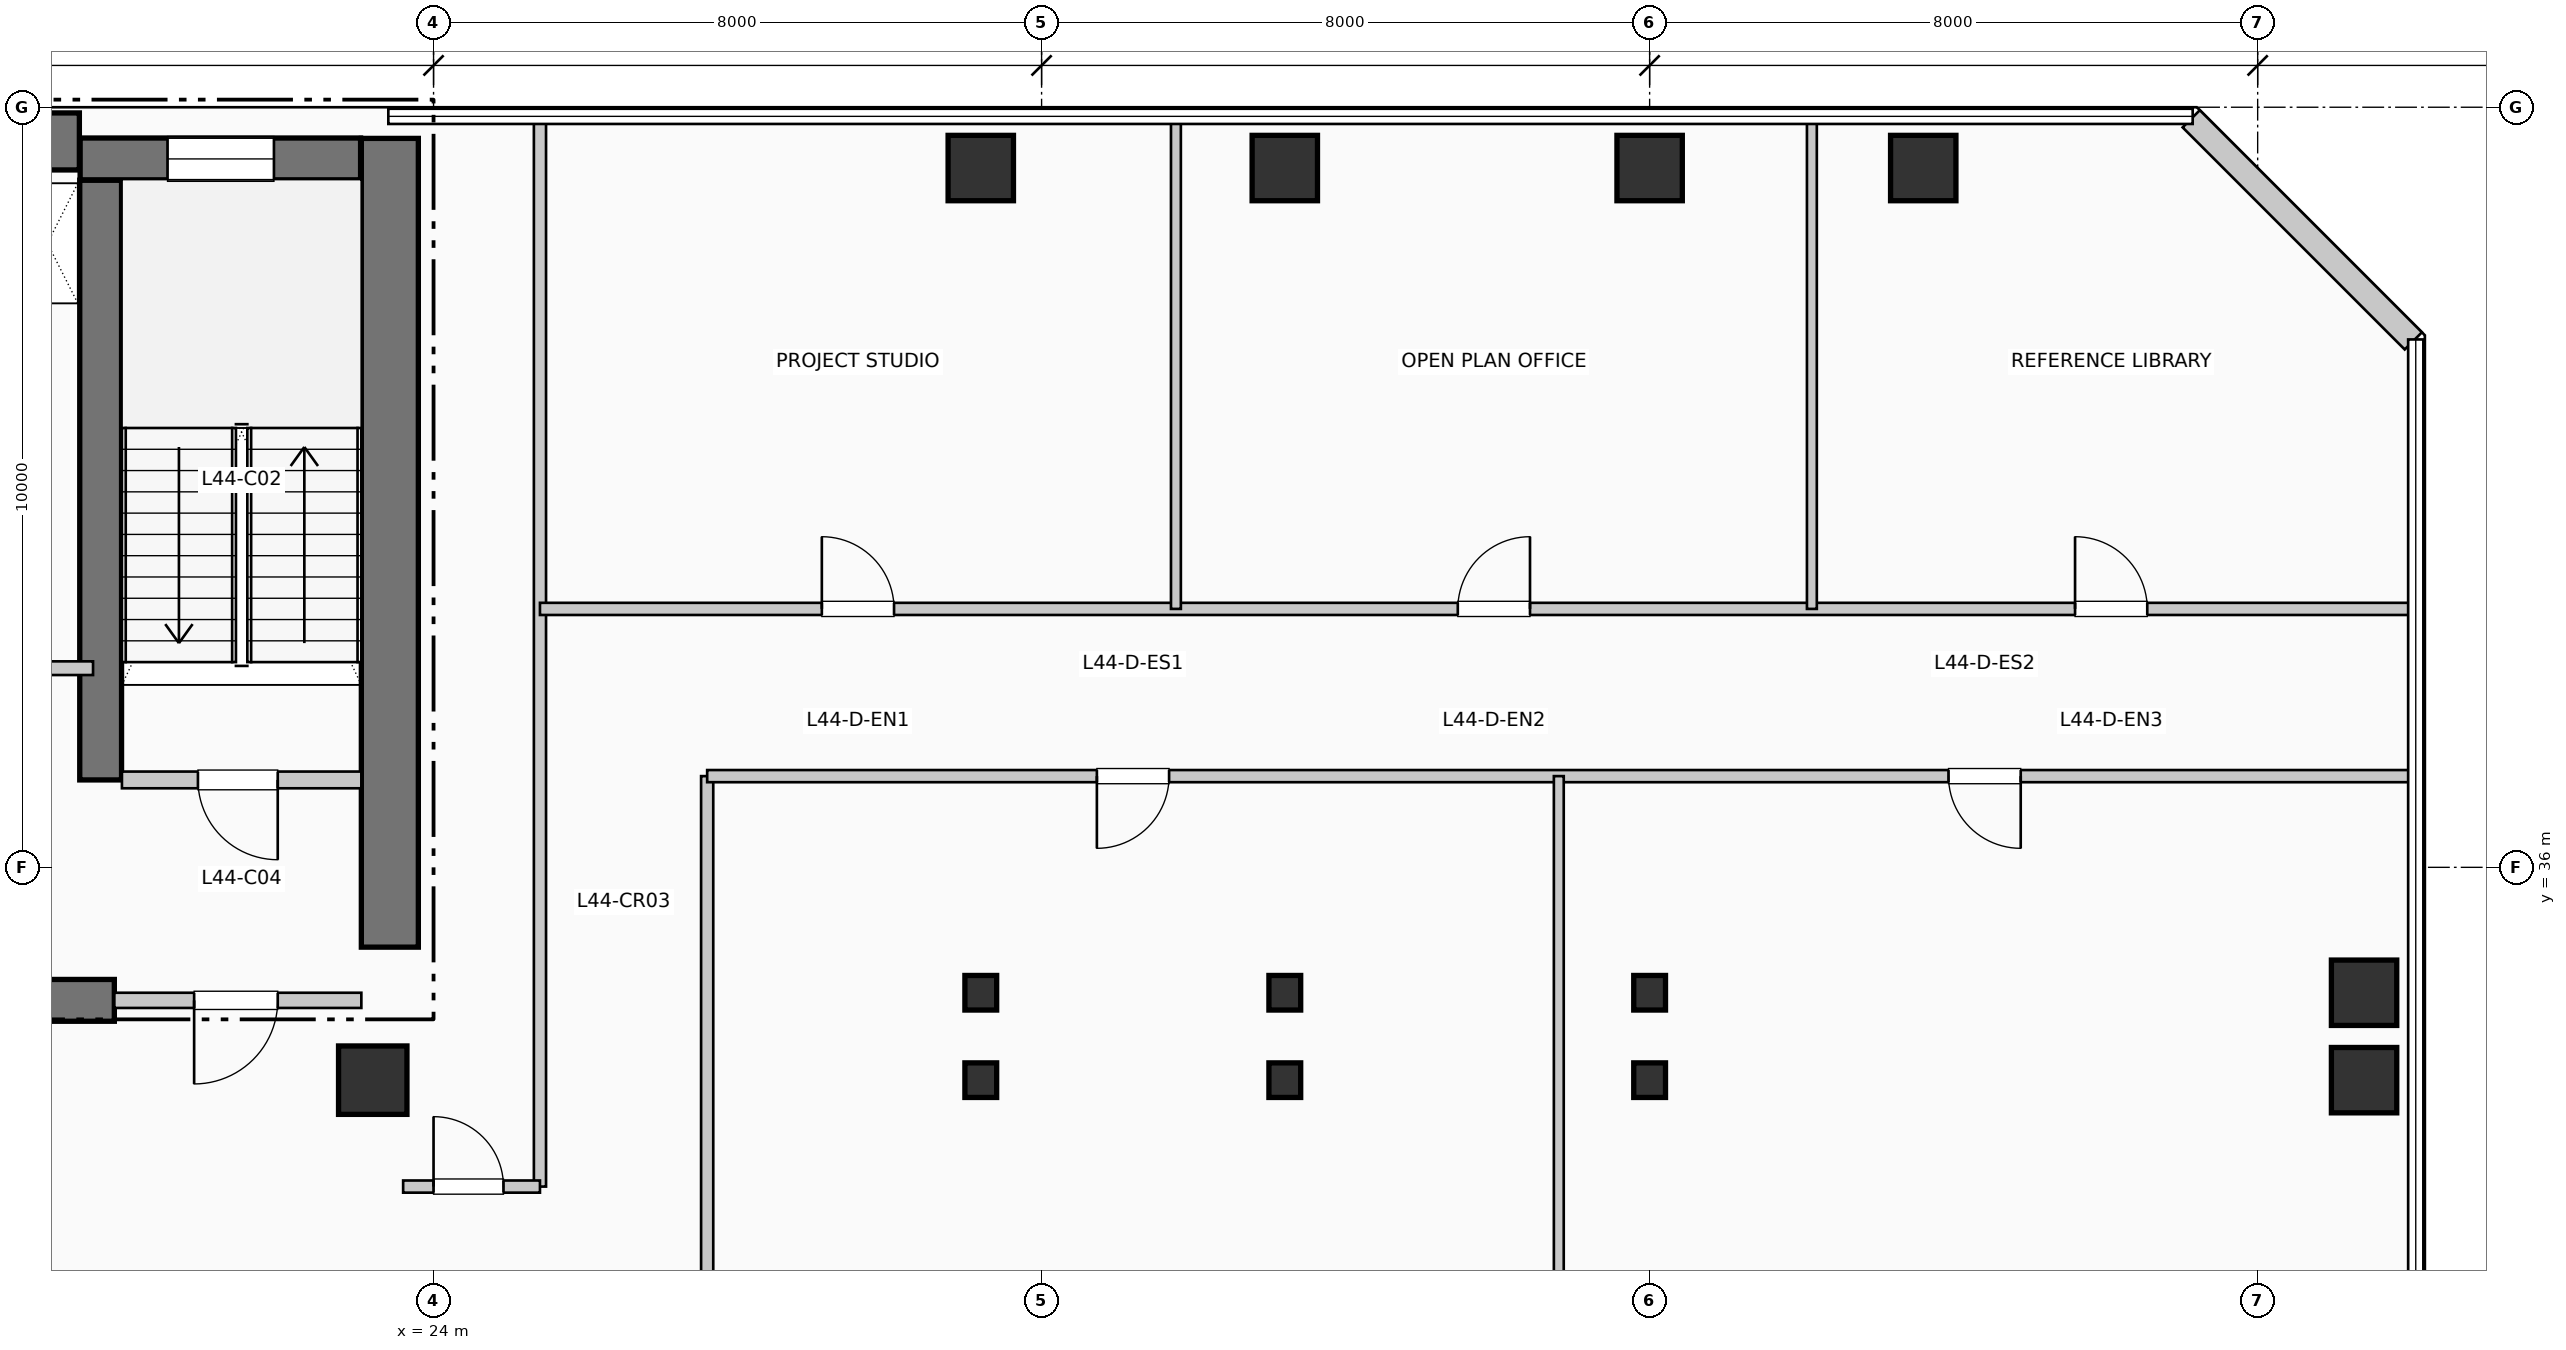
"""IFC4 building model, lengths in metres.
Left out: names, types, materials, properties, quantities, classifications, styles, units other than length and angle.
Written with IfcOpenShell. Run it as: python <this file> out.ifc"""

import sys

from ifc_helpers import new_model, si_unit, direction, frame, frame_2d, origin, origin_2d, place, context, subcontext, project, spatial, rectangle, i_section, extrude, element, fill, save


model = new_model("IFC4")
c1 = context("Model", 3, precision=1e-05, world=origin(), true_north=direction((0.0, 1.0)))
c2 = subcontext(c1, "Body", "Model", "MODEL_VIEW")
j1 = project(units=[si_unit("LENGTHUNIT", "METRE"), si_unit("PLANEANGLEUNIT", "RADIAN")], contexts=[c1])
p1 = place(None, origin())
s1 = spatial("IfcSite", under=j1, at=p1, CompositionType="ELEMENT")
p2 = place(p1, origin())
s2 = spatial("IfcBuilding", under=s1, at=p2, CompositionType="ELEMENT")
p3 = place(p2, frame((0.0, 0.0, 183.48)))
s3 = spatial("IfcBuildingStorey", under=s2, at=p3, CompositionType="ELEMENT", Elevation=183.48)
p4 = place(p3, frame((5.36, 45.55, 0.0), z_axis=(0.0, 0.0, 1.0), x_axis=(1.0, 0.0, 0.0)))
e1 = element("IfcWall", 1, at=p4, inside=s3, PredefinedType="SHEAR", context=c2, shape_type="SweptSolid", body=[
    extrude(rectangle(XDim=13.98, YDim=0.75, at=frame_2d((6.99, 0.0))), origin(), (0.0, 0.0, 1.0), 3.96),
])
p5 = place(p3, frame((23.425, 34.95, 0.0), z_axis=(0.0, 0.0, 1.0), x_axis=(0.0, 1.0, 0.0)))
e2 = element("IfcWall", 2, at=p5, inside=s3, PredefinedType="SHEAR", context=c2, shape_type="SweptSolid", body=[
    extrude(rectangle(XDim=10.64, YDim=0.75, at=frame_2d((5.32, 0.0))), origin(), (0.0, 0.0, 1.0), 3.96),
])
p6 = place(p3, frame((13.68, 34.25, 0.0), z_axis=(0.0, 0.0, 1.0), x_axis=(1.0, 0.0, 0.0)))
e3 = element("IfcWall", 3, at=p6, inside=s3, PredefinedType="SHEAR", context=c2, shape_type="SweptSolid", body=[
    extrude(rectangle(XDim=6.12, YDim=0.55, at=frame_2d((3.06, 0.0))), origin(), (0.0, 0.0, 1.0), 3.96),
])
p7 = place(p3, frame((19.62, 37.15, 0.0), z_axis=(0.0, 0.0, 1.0), x_axis=(0.0, 1.0, 0.0)))
e4 = element("IfcWall", 4, at=p7, inside=s3, PredefinedType="SHEAR", context=c2, shape_type="SweptSolid", body=[
    extrude(rectangle(XDim=7.89, YDim=0.55, at=frame_2d((3.945, 0.0))), origin(), (0.0, 0.0, 1.0), 3.96),
])
p8 = place(p3, frame((19.35, 45.32, 0.0), z_axis=(0.0, 0.0, 1.0), x_axis=(1.0, 0.0, 0.0)))
e5 = element("IfcWall", 5, at=p8, inside=s3, PredefinedType="SHEAR", context=c2, shape_type="SweptSolid", body=[
    extrude(rectangle(XDim=3.69, YDim=0.55, at=frame_2d((1.845, 0.0))), origin(), (0.0, 0.0, 1.0), 3.96),
])
p9 = place(p8, frame((1.15, 0.0, 1.05)))
e6 = element("IfcOpeningElement", 6, at=p9, cuts=e5, PredefinedType="OPENING", context=c2, shape_type="SweptSolid", body=[
    extrude(rectangle(XDim=1.4, YDim=1.8, at=frame_2d((0.7, 0.9))), frame((0.0, 0.285, 0.0), z_axis=(0.0, -1.0, 0.0), x_axis=(1.0, 0.0, 0.0)), (0.0, 0.0, 1.0), 0.57),
])
p10 = place(p3, frame((23.2, 33.2, 0.0), z_axis=(0.0, 0.0, 1.0), x_axis=(1.0, 0.0, 0.0)))
e7 = element("IfcColumn", 7, at=p10, inside=s3, PredefinedType="COLUMN", context=c2, shape_type="SweptSolid", body=[
    extrude(rectangle(XDim=0.9, YDim=0.9, at=origin_2d()), origin(), (0.0, 0.0, 1.0), 3.96),
])
for number, where, z_axis, x_axis in (
    (8, (31.2, 33.2, 0.0), (0.0, 0.0, 1.0), (1.0, 0.0, 0.0)),
    (9, (31.2, 34.35, 0.0), (0.0, 0.0, 1.0), (1.0, 0.0, 0.0)),
):
    element("IfcColumn", number, at=place(p3, frame(where, z_axis=z_axis, x_axis=x_axis)), inside=s3, PredefinedType="COLUMN", context=c2, shape_type="SweptSolid", body=[
        extrude(i_section(OverallWidth=0.418, OverallDepth=0.455, WebThickness=0.032, FlangeThickness=0.051, at=origin_2d()), origin(), (0.0, 0.0, 1.0), 3.96),
    ])
p11 = place(p3, frame((31.2, 45.2, 0.0), z_axis=(0.0, 0.0, 1.0), x_axis=(1.0, 0.0, 0.0)))
e10 = element("IfcColumn", 10, at=p11, inside=s3, PredefinedType="COLUMN", context=c2, shape_type="SweptSolid", body=[
    extrude(rectangle(XDim=0.86, YDim=0.86, at=origin_2d()), origin(), (0.0, 0.0, 1.0), 3.96),
])
for number, where, z_axis, x_axis in (
    (11, (35.2, 33.2, 0.0), (0.0, 0.0, 1.0), (1.0, 0.0, 0.0)),
    (12, (35.2, 34.35, 0.0), (0.0, 0.0, 1.0), (1.0, 0.0, 0.0)),
):
    element("IfcColumn", number, at=place(p3, frame(where, z_axis=z_axis, x_axis=x_axis)), inside=s3, PredefinedType="COLUMN", context=c2, shape_type="SweptSolid", body=[
        extrude(i_section(OverallWidth=0.418, OverallDepth=0.455, WebThickness=0.032, FlangeThickness=0.051, at=origin_2d()), origin(), (0.0, 0.0, 1.0), 3.96),
    ])
p12 = place(p3, frame((35.2, 45.2, 0.0), z_axis=(0.0, 0.0, 1.0), x_axis=(1.0, 0.0, 0.0)))
e13 = element("IfcColumn", 13, at=p12, inside=s3, PredefinedType="COLUMN", context=c2, shape_type="SweptSolid", body=[
    extrude(rectangle(XDim=0.86, YDim=0.86, at=origin_2d()), origin(), (0.0, 0.0, 1.0), 3.96),
])
for number, where, z_axis, x_axis in (
    (14, (40.0, 33.2, 0.0), (0.0, 0.0, 1.0), (1.0, 0.0, 0.0)),
    (15, (40.0, 34.35, 0.0), (0.0, 0.0, 1.0), (1.0, 0.0, 0.0)),
):
    element("IfcColumn", number, at=place(p3, frame(where, z_axis=z_axis, x_axis=x_axis)), inside=s3, PredefinedType="COLUMN", context=c2, shape_type="SweptSolid", body=[
        extrude(i_section(OverallWidth=0.418, OverallDepth=0.455, WebThickness=0.032, FlangeThickness=0.051, at=origin_2d()), origin(), (0.0, 0.0, 1.0), 3.96),
    ])
for number, where, z_axis, x_axis in (
    (16, (40.0, 45.2, 0.0), (0.0, 0.0, 1.0), (1.0, 0.0, 0.0)),
    (17, (43.6, 45.2, 0.0), (0.0, 0.0, 1.0), (1.0, 0.0, 0.0)),
    (18, (49.4, 33.2, 0.0), (0.0, 0.0, 1.0), (1.0, 0.0, 0.0)),
    (19, (49.4, 34.35, 0.0), (0.0, 0.0, 1.0), (1.0, 0.0, 0.0)),
):
    element("IfcColumn", number, at=place(p3, frame(where, z_axis=z_axis, x_axis=x_axis)), inside=s3, PredefinedType="COLUMN", context=c2, shape_type="SweptSolid", body=[
        extrude(rectangle(XDim=0.86, YDim=0.86, at=origin_2d()), origin(), (0.0, 0.0, 1.0), 3.96),
    ])
p13 = place(p3, frame((50.048, 42.926, 0.0), z_axis=(0.0, 0.0, 1.0), x_axis=(-0.707136318428, 0.707077242712, 0.0)))
e20 = element("IfcWall", 20, at=p13, inside=s3, PredefinedType="SOLIDWALL", context=c2, shape_type="SweptSolid", body=[
    extrude(rectangle(XDim=4.133, YDim=0.32, at=frame_2d((2.066, 0.0))), origin(), (0.0, 0.0, 1.0), 3.71),
])
p14 = place(p3, frame((19.9, 37.15, 0.0), z_axis=(0.0, 0.0, 1.0), x_axis=(1.0, 0.0, 0.0)))
e21 = element("IfcWall", 21, at=p14, inside=s3, PredefinedType="PARTITIONING", context=c2, shape_type="SweptSolid", body=[
    extrude(rectangle(XDim=3.15, YDim=0.22, at=frame_2d((1.575, 0.0))), origin(), (0.0, 0.0, 1.0), 3.71),
])
p15 = place(p14, frame((2.05, 0.0, 0.0), z_axis=(0.0, 0.0, 1.0), x_axis=(-1.0, 0.0, 0.0)))
e22 = element("IfcOpeningElement", 22, at=p15, cuts=e21, PredefinedType="OPENING", context=c2, shape_type="SweptSolid", body=[
    extrude(rectangle(XDim=1.05, YDim=2.15, at=frame_2d((0.525, 1.075))), frame((0.0, 0.12, 0.0), z_axis=(0.0, -1.0, 0.0), x_axis=(1.0, 0.0, 0.0)), (0.0, 0.0, 1.0), 0.24),
])
p16 = place(p3, frame((19.8, 34.25, 0.0), z_axis=(0.0, 0.0, 1.0), x_axis=(1.0, 0.0, 0.0)))
e23 = element("IfcWall", 23, at=p16, inside=s3, PredefinedType="PARTITIONING", context=c2, shape_type="SweptSolid", body=[
    extrude(rectangle(XDim=3.25, YDim=0.2, at=frame_2d((1.625, 0.0))), origin(), (0.0, 0.0, 1.0), 3.71),
])
p17 = place(p16, frame((2.15, 0.0, 0.0), z_axis=(0.0, 0.0, 1.0), x_axis=(-1.0, 0.0, 0.0)))
e24 = element("IfcOpeningElement", 24, at=p17, cuts=e23, PredefinedType="OPENING", context=c2, shape_type="SweptSolid", body=[
    extrude(rectangle(XDim=1.1, YDim=2.15, at=frame_2d((0.55, 1.075))), frame((0.0, 0.11, 0.0), z_axis=(0.0, -1.0, 0.0), x_axis=(1.0, 0.0, 0.0)), (0.0, 0.0, 1.0), 0.22),
])
p18 = place(p3, frame((17.68, 38.62, 0.0), z_axis=(0.0, 0.0, 1.0), x_axis=(1.0, 0.0, 0.0)))
e25 = element("IfcWall", 25, at=p18, inside=s3, PredefinedType="PARTITIONING", context=c2, shape_type="SweptSolid", body=[
    extrude(rectangle(XDim=1.84, YDim=0.18, at=frame_2d((0.92, 0.0))), origin(), (0.0, 0.0, 1.0), 3.71),
])
p19 = place(p18, frame((0.24, 0.0, 0.0)))
e26 = element("IfcOpeningElement", 26, at=p19, cuts=e25, PredefinedType="OPENING", context=c2, shape_type="SweptSolid", body=[
    extrude(rectangle(XDim=0.92, YDim=2.1, at=frame_2d((0.46, 1.05))), frame((0.0, 0.1, 0.0), z_axis=(0.0, -1.0, 0.0), x_axis=(1.0, 0.0, 0.0)), (0.0, 0.0, 1.0), 0.2),
])
p20 = place(p3, frame((25.4, 31.8, 0.0), z_axis=(0.0, 0.0, 1.0), x_axis=(0.0, 1.0, 0.0)))
e27 = element("IfcWall", 27, at=p20, inside=s3, PredefinedType="PARTITIONING", context=c2, shape_type="SweptSolid", body=[
    extrude(rectangle(XDim=14.01, YDim=0.16, at=frame_2d((7.005, 0.0))), origin(), (0.0, 0.0, 1.0), 3.71),
])
p21 = place(p3, frame((27.6, 22.19, 0.0), z_axis=(0.0, 0.0, 1.0), x_axis=(0.0, 1.0, 0.0)))
e28 = element("IfcWall", 28, at=p21, inside=s3, PredefinedType="PARTITIONING", context=c2, shape_type="SweptSolid", body=[
    extrude(rectangle(XDim=15.01, YDim=0.16, at=frame_2d((7.505, 0.0))), origin(), (0.0, 0.0, 1.0), 3.71),
])
p22 = place(p21, frame((2.15, 0.0, 0.0), z_axis=(0.0, 0.0, 1.0), x_axis=(-1.0, 0.0, 0.0)))
e29 = element("IfcOpeningElement", 29, at=p22, cuts=e28, PredefinedType="OPENING", context=c2, shape_type="SweptSolid", body=[
    extrude(rectangle(XDim=0.95, YDim=2.15, at=frame_2d((0.475, 1.075))), frame((0.0, 0.09, 0.0), z_axis=(0.0, -1.0, 0.0), x_axis=(1.0, 0.0, 0.0)), (0.0, 0.0, 1.0), 0.18),
])
p23 = place(p3, frame((27.6, 37.2, 0.0), z_axis=(0.0, 0.0, 1.0), x_axis=(1.0, 0.0, 0.0)))
e30 = element("IfcWall", 30, at=p23, inside=s3, PredefinedType="PARTITIONING", context=c2, shape_type="SweptSolid", body=[
    extrude(rectangle(XDim=22.41, YDim=0.16, at=frame_2d((11.205, 0.0))), origin(), (0.0, 0.0, 1.0), 3.71),
])
p24 = place(p23, frame((6.077, 0.0, 0.0), z_axis=(0.0, 0.0, 1.0), x_axis=(-1.0, 0.0, 0.0)))
e31 = element("IfcOpeningElement", 31, at=p24, cuts=e30, PredefinedType="OPENING", context=c2, shape_type="SweptSolid", body=[
    extrude(rectangle(XDim=0.95, YDim=2.15, at=frame_2d((0.475, 1.075))), frame((0.0, 0.09, 0.0), z_axis=(0.0, -1.0, 0.0), x_axis=(1.0, 0.0, 0.0)), (0.0, 0.0, 1.0), 0.18),
])
p25 = place(p23, frame((17.282, 0.0, 0.0), z_axis=(0.0, 0.0, 1.0), x_axis=(-1.0, 0.0, 0.0)))
e32 = element("IfcOpeningElement", 32, at=p25, cuts=e30, PredefinedType="OPENING", context=c2, shape_type="SweptSolid", body=[
    extrude(rectangle(XDim=0.95, YDim=2.15, at=frame_2d((0.475, 1.075))), frame((0.0, 0.09, 0.0), z_axis=(0.0, -1.0, 0.0), x_axis=(1.0, 0.0, 0.0)), (0.0, 0.0, 1.0), 0.18),
])
p26 = place(p3, frame((25.4, 39.4, 0.0), z_axis=(0.0, 0.0, 1.0), x_axis=(1.0, 0.0, 0.0)))
e33 = element("IfcWall", 33, at=p26, inside=s3, PredefinedType="PARTITIONING", context=c2, shape_type="SweptSolid", body=[
    extrude(rectangle(XDim=24.61, YDim=0.16, at=frame_2d((12.305, 0.0))), origin(), (0.0, 0.0, 1.0), 3.365),
])
p27 = place(p26, frame((3.709, 0.0, 0.0)))
e34 = element("IfcOpeningElement", 34, at=p27, cuts=e33, PredefinedType="OPENING", context=c2, shape_type="SweptSolid", body=[
    extrude(rectangle(XDim=0.95, YDim=2.15, at=frame_2d((0.475, 1.075))), frame((0.0, 0.09, 0.0), z_axis=(0.0, -1.0, 0.0), x_axis=(1.0, 0.0, 0.0)), (0.0, 0.0, 1.0), 0.18),
])
p28 = place(p26, frame((12.076, 0.0, 0.0)))
e35 = element("IfcOpeningElement", 35, at=p28, cuts=e33, PredefinedType="OPENING", context=c2, shape_type="SweptSolid", body=[
    extrude(rectangle(XDim=0.95, YDim=2.15, at=frame_2d((0.475, 1.075))), frame((0.0, 0.09, 0.0), z_axis=(0.0, -1.0, 0.0), x_axis=(1.0, 0.0, 0.0)), (0.0, 0.0, 1.0), 0.18),
])
p29 = place(p26, frame((20.198, 0.0, 0.0)))
e36 = element("IfcOpeningElement", 36, at=p29, cuts=e33, PredefinedType="OPENING", context=c2, shape_type="SweptSolid", body=[
    extrude(rectangle(XDim=0.95, YDim=2.15, at=frame_2d((0.475, 1.075))), frame((0.0, 0.09, 0.0), z_axis=(0.0, -1.0, 0.0), x_axis=(1.0, 0.0, 0.0)), (0.0, 0.0, 1.0), 0.18),
])
p30 = place(p3, frame((23.6, 31.8, 0.0), z_axis=(0.0, 0.0, 1.0), x_axis=(1.0, 0.0, 0.0)))
e37 = element("IfcWall", 37, at=p30, inside=s3, PredefinedType="PARTITIONING", context=c2, shape_type="SweptSolid", body=[
    extrude(rectangle(XDim=1.8, YDim=0.16, at=frame_2d((0.9, 0.0))), origin(), (0.0, 0.0, 1.0), 3.71),
])
p31 = place(p30, frame((0.4, 0.0, 0.0)))
e38 = element("IfcOpeningElement", 38, at=p31, cuts=e37, PredefinedType="OPENING", context=c2, shape_type="SweptSolid", body=[
    extrude(rectangle(XDim=0.92, YDim=2.1, at=frame_2d((0.46, 1.05))), frame((0.0, 0.09, 0.0), z_axis=(0.0, -1.0, 0.0), x_axis=(1.0, 0.0, 0.0)), (0.0, 0.0, 1.0), 0.18),
])
p32 = place(p3, frame((38.805, 22.19, 0.0), z_axis=(0.0, 0.0, 1.0), x_axis=(0.0, 1.0, 0.0)))
e39 = element("IfcWall", 39, at=p32, inside=s3, PredefinedType="PARTITIONING", context=c2, shape_type="SweptSolid", body=[
    extrude(rectangle(XDim=15.01, YDim=0.13, at=frame_2d((7.505, 0.0))), origin(), (0.0, 0.0, 1.0), 3.71),
])
for number, where, z_axis, x_axis in (
    (40, (33.767, 39.4, 0.0), (0.0, 0.0, 1.0), (0.0, 1.0, 0.0)),
    (41, (42.135, 39.4, 0.0), (0.0, 0.0, 1.0), (0.0, 1.0, 0.0)),
):
    element("IfcWall", number, at=place(p3, frame(where, z_axis=z_axis, x_axis=x_axis)), inside=s3, PredefinedType="PARTITIONING", context=c2, shape_type="SweptSolid", body=[
        extrude(rectangle(XDim=6.41, YDim=0.13, at=frame_2d((3.205, 0.0))), origin(), (0.0, 0.0, 1.0), 3.71),
    ])
p33 = place(p9, origin())
e42 = element("IfcWindow", 42, at=p33, inside=s3, PartitioningType="SINGLE_PANEL", PredefinedType="WINDOW", context=c2, shape_type="SweptSolid", body=[
    extrude(rectangle(XDim=1.4, YDim=1.8, at=frame_2d((0.7, 0.9))), frame((0.0, 0.03, 0.0), z_axis=(0.0, -1.0, 0.0), x_axis=(1.0, 0.0, 0.0)), (0.0, 0.0, 1.0), 0.06),
])
fill(e6, e42)
p34 = place(p15, origin())
e43 = element("IfcDoor", 43, at=p34, inside=s3, OperationType="SINGLE_SWING_RIGHT", PredefinedType="DOOR", context=c2, shape_type="SweptSolid", body=[
    extrude(rectangle(XDim=1.05, YDim=2.15, at=frame_2d((0.525, 1.075))), frame((0.0, 0.025, 0.0), z_axis=(0.0, -1.0, 0.0), x_axis=(1.0, 0.0, 0.0)), (0.0, 0.0, 1.0), 0.05),
])
fill(e22, e43)
p35 = place(p17, origin())
e44 = element("IfcDoor", 44, at=p35, inside=s3, OperationType="SINGLE_SWING_LEFT", PredefinedType="DOOR", context=c2, shape_type="SweptSolid", body=[
    extrude(rectangle(XDim=1.1, YDim=2.15, at=frame_2d((0.55, 1.075))), frame((0.0, 0.025, 0.0), z_axis=(0.0, -1.0, 0.0), x_axis=(1.0, 0.0, 0.0)), (0.0, 0.0, 1.0), 0.05),
])
fill(e24, e44)
p36 = place(p31, origin())
e45 = element("IfcDoor", 45, at=p36, inside=s3, OperationType="SINGLE_SWING_LEFT", PredefinedType="DOOR", context=c2, shape_type="SweptSolid", body=[
    extrude(rectangle(XDim=0.92, YDim=2.1, at=frame_2d((0.46, 1.05))), frame((0.0, 0.025, 0.0), z_axis=(0.0, -1.0, 0.0), x_axis=(1.0, 0.0, 0.0)), (0.0, 0.0, 1.0), 0.05),
])
fill(e38, e45)
p37 = place(p24, origin())
e46 = element("IfcDoor", 46, at=p37, inside=s3, OperationType="SINGLE_SWING_LEFT", PredefinedType="DOOR", context=c2, shape_type="SweptSolid", body=[
    extrude(rectangle(XDim=0.95, YDim=2.15, at=frame_2d((0.475, 1.075))), frame((0.0, 0.025, 0.0), z_axis=(0.0, -1.0, 0.0), x_axis=(1.0, 0.0, 0.0)), (0.0, 0.0, 1.0), 0.05),
])
fill(e31, e46)
p38 = place(p25, origin())
e47 = element("IfcDoor", 47, at=p38, inside=s3, OperationType="SINGLE_SWING_RIGHT", PredefinedType="DOOR", context=c2, shape_type="SweptSolid", body=[
    extrude(rectangle(XDim=0.95, YDim=2.15, at=frame_2d((0.475, 1.075))), frame((0.0, 0.025, 0.0), z_axis=(0.0, -1.0, 0.0), x_axis=(1.0, 0.0, 0.0)), (0.0, 0.0, 1.0), 0.05),
])
fill(e32, e47)
p39 = place(p27, origin())
e48 = element("IfcDoor", 48, at=p39, inside=s3, OperationType="SINGLE_SWING_LEFT", PredefinedType="DOOR", context=c2, shape_type="SweptSolid", body=[
    extrude(rectangle(XDim=0.95, YDim=2.15, at=frame_2d((0.475, 1.075))), frame((0.0, 0.025, 0.0), z_axis=(0.0, -1.0, 0.0), x_axis=(1.0, 0.0, 0.0)), (0.0, 0.0, 1.0), 0.05),
])
fill(e34, e48)
p40 = place(p28, origin())
e49 = element("IfcDoor", 49, at=p40, inside=s3, OperationType="SINGLE_SWING_RIGHT", PredefinedType="DOOR", context=c2, shape_type="SweptSolid", body=[
    extrude(rectangle(XDim=0.95, YDim=2.15, at=frame_2d((0.475, 1.075))), frame((0.0, 0.025, 0.0), z_axis=(0.0, -1.0, 0.0), x_axis=(1.0, 0.0, 0.0)), (0.0, 0.0, 1.0), 0.05),
])
fill(e35, e49)
p41 = place(p29, origin())
e50 = element("IfcDoor", 50, at=p41, inside=s3, OperationType="SINGLE_SWING_LEFT", PredefinedType="DOOR", context=c2, shape_type="SweptSolid", body=[
    extrude(rectangle(XDim=0.95, YDim=2.15, at=frame_2d((0.475, 1.075))), frame((0.0, 0.025, 0.0), z_axis=(0.0, -1.0, 0.0), x_axis=(1.0, 0.0, 0.0)), (0.0, 0.0, 1.0), 0.05),
])
fill(e36, e50)
save(model, sys.argv[1])
